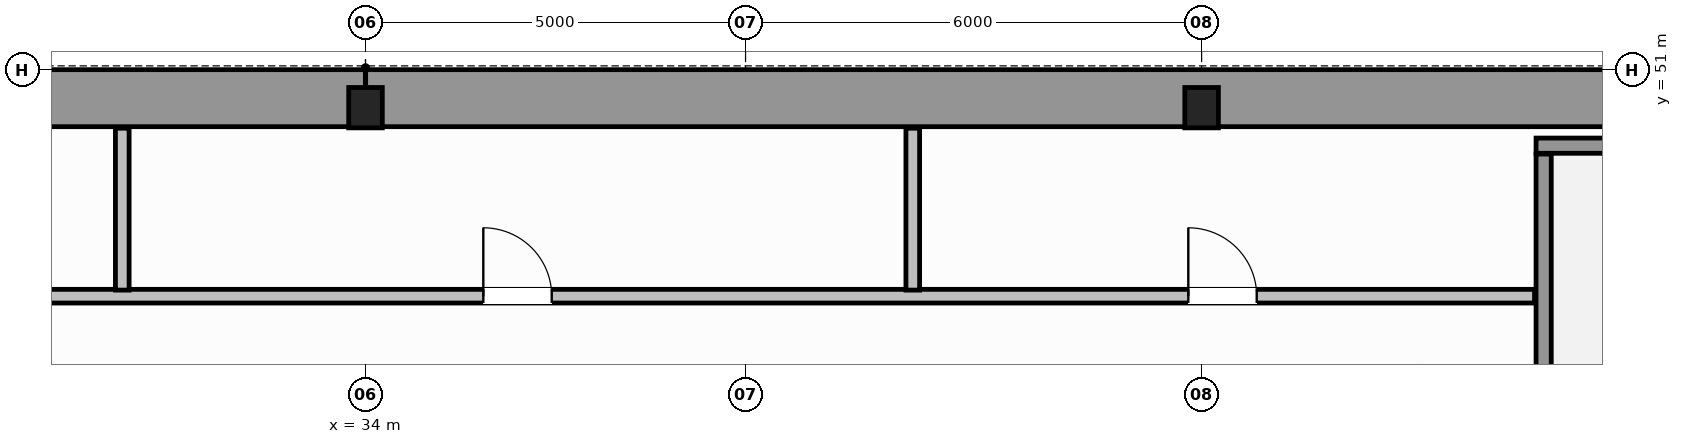
"""IFC4 building model, lengths in metres.
Left out: names, types, materials, properties, quantities, classifications, styles, units other than length and angle.
Written with IfcOpenShell. Run it as: python <this file> out.ifc"""

import sys

from ifc_helpers import new_model, si_unit, direction, frame, frame_2d, origin, origin_2d, place, context, subcontext, project, spatial, rectangle, i_section, extrude, source, transform, mapped, element, fill, save


model = new_model("IFC4")
c1 = context("Model", 3, precision=1e-05, world=origin(), true_north=direction((0.0, 1.0)))
c2 = subcontext(c1, "Body", "Model", "MODEL_VIEW")
j1 = project(units=[si_unit("LENGTHUNIT", "METRE"), si_unit("PLANEANGLEUNIT", "RADIAN")], contexts=[c1])
p1 = place(None, origin())
s1 = spatial("IfcSite", under=j1, at=p1, CompositionType="ELEMENT")
p2 = place(p1, origin())
s2 = spatial("IfcBuilding", under=s1, at=p2, CompositionType="ELEMENT")
p3 = place(p2, frame((0.0, 0.0, 99.6)))
s3 = spatial("IfcBuildingStorey", under=s2, at=p3, CompositionType="ELEMENT", Elevation=99.6)
m1 = source(origin(), c2, "Body", "SweptSolid", [
    extrude(i_section(OverallWidth=0.442, OverallDepth=0.531, WebThickness=0.065, FlangeThickness=0.076, FilletRadius=0.015, at=origin_2d()), origin(), (0.0, 0.0, 1.0), 3.8),
])
for number, where, z_axis, x_axis in (
    (1, (34.0, 50.5, 0.0), (0.0, 0.0, 1.0), (1.0, 0.0, 0.0)),
    (2, (45.0, 50.5, 0.0), (0.0, 0.0, 1.0), (1.0, 0.0, 0.0)),
):
    element("IfcColumn", number, at=place(p3, frame(where, z_axis=z_axis, x_axis=x_axis)), inside=s3, PredefinedType="COLUMN", context=c2, shape_type="MappedRepresentation", body=[
        mapped(m1, transform((0.0, 0.0, 0.0), scale=1.0)),
    ])
for number, where, z_axis, x_axis in (
    (3, (14.379, 50.625, 0.0), (0.0, 0.0, 1.0), (1.0, 0.0, 0.0)),
    (4, (34.002, 50.625, 0.0), (0.0, 0.0, 1.0), (1.0, 0.0, 0.0)),
):
    element("IfcWall", number, at=place(p3, frame(where, z_axis=z_axis, x_axis=x_axis)), inside=s3, PredefinedType="SHEAR", context=c2, shape_type="SweptSolid", body=[
        extrude(rectangle(XDim=19.619, YDim=0.75, at=frame_2d((9.81, 0.0))), origin(), (0.0, 0.0, 1.0), 3.8),
    ])
p4 = place(p3, frame((49.4, 50.0, 0.0), z_axis=(0.0, 0.0, 1.0), x_axis=(1.0, 0.0, 0.0)))
e5 = element("IfcWall", 5, at=p4, inside=s3, PredefinedType="SOLIDWALL", context=c2, shape_type="SweptSolid", body=[
    extrude(rectangle(XDim=4.225, YDim=0.2, at=frame_2d((2.113, 0.0))), origin(), (0.0, 0.0, 1.0), 3.8),
])
p5 = place(p3, frame((49.5, 39.96, 0.0), z_axis=(0.0, 0.0, 1.0), x_axis=(0.0, 1.0, 0.0)))
e6 = element("IfcWall", 6, at=p5, inside=s3, PredefinedType="SOLIDWALL", context=c2, shape_type="SweptSolid", body=[
    extrude(rectangle(XDim=9.93, YDim=0.2, at=frame_2d((4.965, 0.0))), origin(), (0.0, 0.0, 1.0), 3.8),
])
p6 = place(p3, frame((18.62, 48.02, 0.0), z_axis=(0.0, 0.0, 1.0), x_axis=(1.0, 0.0, 0.0)))
e7 = element("IfcWall", 7, at=p6, inside=s3, PredefinedType="PLUMBINGWALL", context=c2, shape_type="SweptSolid", body=[
    extrude(rectangle(XDim=30.76, YDim=0.18, at=frame_2d((15.38, 0.0))), origin(), (0.0, 0.0, 1.0), 3.58),
])
p7 = place(p6, frame((1.955, 0.0, 0.0)))
e8 = element("IfcOpeningElement", 8, at=p7, cuts=e7, PredefinedType="OPENING", context=c2, shape_type="SweptSolid", body=[
    extrude(rectangle(XDim=0.9, YDim=2.15, at=frame_2d((0.45, 1.075))), frame((0.0, 0.1, 0.0), z_axis=(0.0, -1.0, 0.0), x_axis=(1.0, 0.0, 0.0)), (0.0, 0.0, 1.0), 0.2),
])
p8 = place(p6, frame((8.03, 0.0, 0.0)))
e9 = element("IfcOpeningElement", 9, at=p8, cuts=e7, PredefinedType="OPENING", context=c2, shape_type="SweptSolid", body=[
    extrude(rectangle(XDim=0.9, YDim=2.15, at=frame_2d((0.45, 1.075))), frame((0.0, 0.1, 0.0), z_axis=(0.0, -1.0, 0.0), x_axis=(1.0, 0.0, 0.0)), (0.0, 0.0, 1.0), 0.2),
])
p9 = place(p6, frame((16.93, 0.0, 0.0)))
e10 = element("IfcOpeningElement", 10, at=p9, cuts=e7, PredefinedType="OPENING", context=c2, shape_type="SweptSolid", body=[
    extrude(rectangle(XDim=0.9, YDim=2.15, at=frame_2d((0.45, 1.075))), frame((0.0, 0.1, 0.0), z_axis=(0.0, -1.0, 0.0), x_axis=(1.0, 0.0, 0.0)), (0.0, 0.0, 1.0), 0.2),
])
p10 = place(p6, frame((26.205, 0.0, 0.0)))
e11 = element("IfcOpeningElement", 11, at=p10, cuts=e7, PredefinedType="OPENING", context=c2, shape_type="SweptSolid", body=[
    extrude(rectangle(XDim=0.9, YDim=2.15, at=frame_2d((0.45, 1.075))), frame((0.0, 0.1, 0.0), z_axis=(0.0, -1.0, 0.0), x_axis=(1.0, 0.0, 0.0)), (0.0, 0.0, 1.0), 0.2),
])
for number, where, z_axis, x_axis in (
    (12, (30.8, 48.1, 0.0), (0.0, 0.0, 1.0), (0.0, 1.0, 0.0)),
    (13, (41.2, 48.1, 0.0), (0.0, 0.0, 1.0), (0.0, 1.0, 0.0)),
):
    element("IfcWall", number, at=place(p3, frame(where, z_axis=z_axis, x_axis=x_axis)), inside=s3, PredefinedType="PLUMBINGWALL", context=c2, shape_type="SweptSolid", body=[
        extrude(rectangle(XDim=2.13, YDim=0.18, at=frame_2d((1.065, 0.0))), origin(), (0.0, 0.0, 1.0), 3.58),
    ])
m2 = source(origin(), c2, "Body", "SweptSolid", [
    extrude(rectangle(XDim=0.9, YDim=2.15, at=frame_2d((0.45, 1.075))), frame((0.0, 0.025, 0.0), z_axis=(0.0, -1.0, 0.0), x_axis=(1.0, 0.0, 0.0)), (0.0, 0.0, 1.0), 0.05),
])
p11 = place(p9, origin())
e14 = element("IfcDoor", 14, at=p11, inside=s3, OperationType="SINGLE_SWING_LEFT", PredefinedType="DOOR", context=c2, shape_type="MappedRepresentation", body=[
    mapped(m2, transform((0.0, 0.0, 0.0), scale=1.0)),
])
fill(e10, e14)
p12 = place(p10, origin())
e15 = element("IfcDoor", 15, at=p12, inside=s3, OperationType="SINGLE_SWING_RIGHT", PredefinedType="DOOR", context=c2, shape_type="MappedRepresentation", body=[
    mapped(m2, transform((0.0, 0.0, 0.0), scale=1.0)),
])
fill(e11, e15)
save(model, sys.argv[1])
